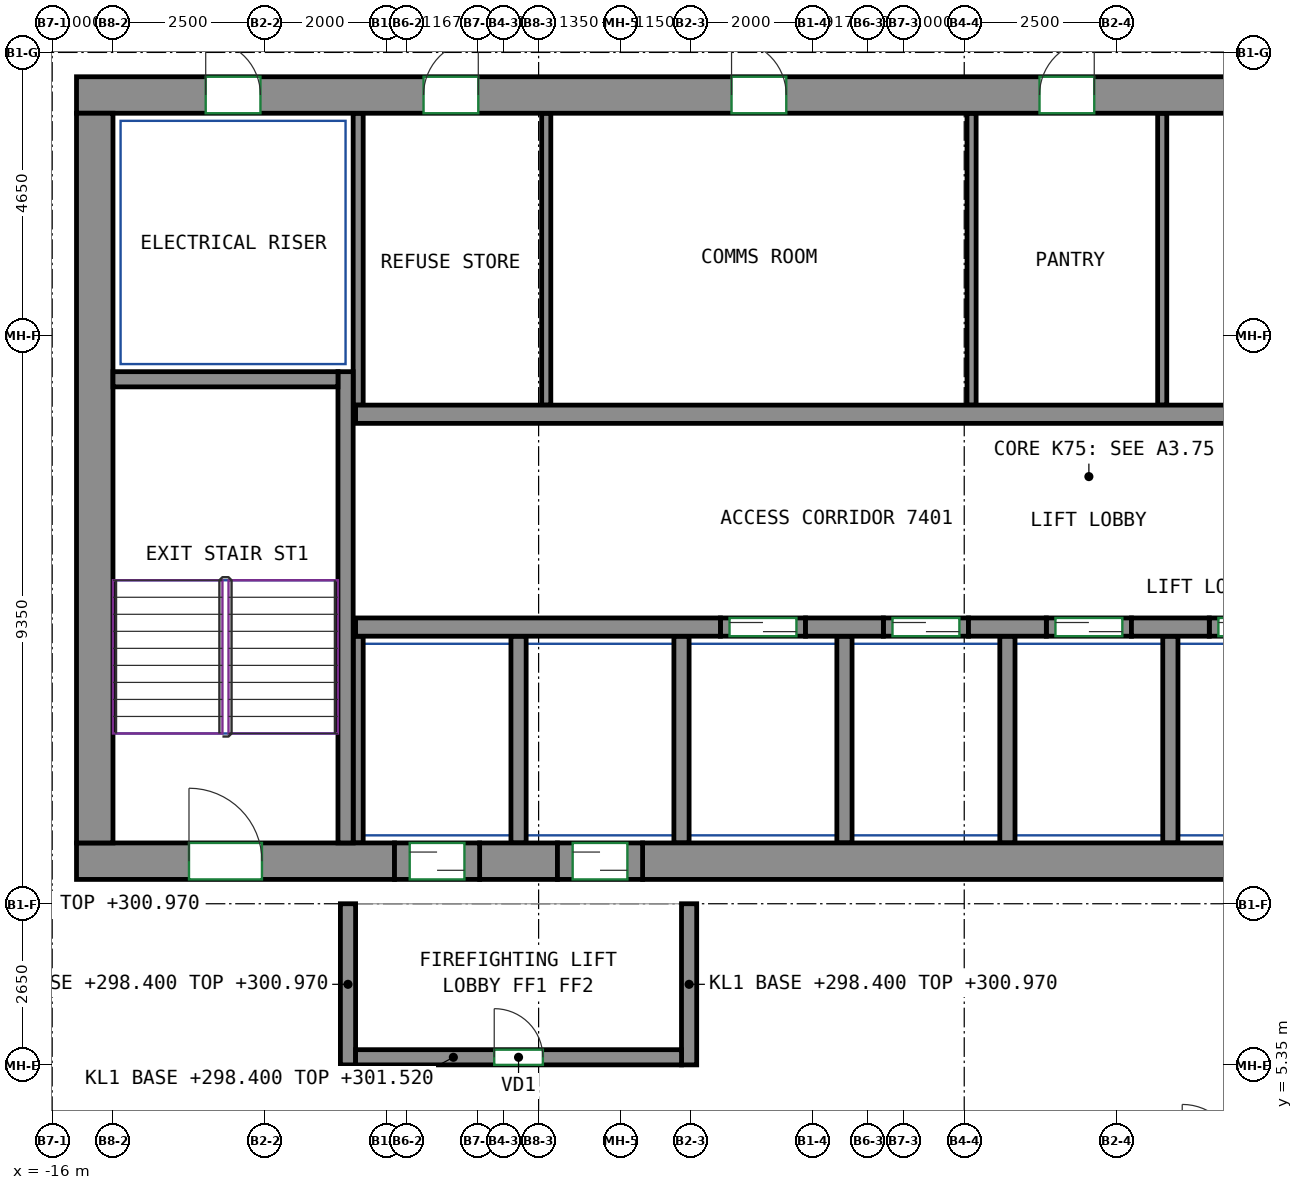
"""IFC4 building model, lengths in metres.
Left out: names, types, materials, properties, quantities, classifications, styles, units other than length and angle.
Written with IfcOpenShell. Run it as: python <this file> out.ifc"""

import sys

from ifc_helpers import new_model, si_unit, direction, frame, frame_2d, origin, place, context, subcontext, project, spatial, rectangle, extrude, source, transform, mapped, element, fill, save


model = new_model("IFC4")
c1 = context("Model", 3, precision=1e-05, world=origin(), true_north=direction((0.0, 1.0)))
c2 = subcontext(c1, "Body", "Model", "MODEL_VIEW")
j1 = project(units=[si_unit("LENGTHUNIT", "METRE"), si_unit("PLANEANGLEUNIT", "RADIAN")], contexts=[c1])
p1 = place(None, origin())
s1 = spatial("IfcSite", under=j1, at=p1, CompositionType="ELEMENT")
p2 = place(p1, origin())
s2 = spatial("IfcBuilding", under=s1, at=p2, CompositionType="ELEMENT")
p3 = place(p2, frame((0.0, 0.0, 298.4)))
s3 = spatial("IfcBuildingStorey", under=s2, at=p3, CompositionType="ELEMENT", Elevation=298.4)
m1 = source(origin(), c2, "Body", "SweptSolid", [
    extrude(rectangle(XDim=5.23, YDim=0.6, at=frame_2d((2.615, 0.0))), origin(), (0.0, 0.0, 1.0), 3.12),
])
p4 = place(p3, frame((-15.6, 8.7, 0.0), z_axis=(0.0, 0.0, 1.0), x_axis=(1.0, 0.0, 0.0)))
e1 = element("IfcWall", 1, at=p4, inside=s3, PredefinedType="SHEAR", context=c2, shape_type="MappedRepresentation", body=[
    mapped(m1, transform((0.0, 0.0, 0.0))),
])
p5 = place(p4, frame((1.85, 0.0, 0.0)))
e2 = element("IfcOpeningElement", 2, at=p5, cuts=e1, PredefinedType="OPENING", context=c2, shape_type="SweptSolid", body=[
    extrude(rectangle(XDim=1.2, YDim=2.1, at=frame_2d((0.6, 1.05))), frame((0.0, 0.31, 0.0), z_axis=(0.0, -1.0, 0.0), x_axis=(1.0, 0.0, 0.0)), (0.0, 0.0, 1.0), 0.62),
])
m2 = source(origin(), c2, "Body", "SweptSolid", [
    extrude(rectangle(XDim=1.28, YDim=0.6, at=frame_2d((0.64, 0.0))), origin(), (0.0, 0.0, 1.0), 3.12),
])
p6 = place(p3, frame((-8.97, 8.7, 0.0), z_axis=(0.0, 0.0, 1.0), x_axis=(1.0, 0.0, 0.0)))
e3 = element("IfcWall", 3, at=p6, inside=s3, PredefinedType="SHEAR", context=c2, shape_type="MappedRepresentation", body=[
    mapped(m2, transform((0.0, 0.0, 0.0))),
])
m3 = source(origin(), c2, "Body", "SweptSolid", [
    extrude(rectangle(XDim=14.18, YDim=0.6, at=frame_2d((7.09, 0.0))), origin(), (0.0, 0.0, 1.0), 3.12),
])
p7 = place(p3, frame((-6.29, 8.7, 0.0), z_axis=(0.0, 0.0, 1.0), x_axis=(1.0, 0.0, 0.0)))
e4 = element("IfcWall", 4, at=p7, inside=s3, PredefinedType="SHEAR", context=c2, shape_type="MappedRepresentation", body=[
    mapped(m3, transform((0.0, 0.0, 0.0))),
])
m4 = source(origin(), c2, "Body", "SweptSolid", [
    extrude(rectangle(XDim=33.3, YDim=0.6, at=frame_2d((16.65, 0.0))), origin(), (0.0, 0.0, 1.0), 3.12),
])
p8 = place(p3, frame((-15.6, 21.3, 0.0), z_axis=(0.0, 0.0, 1.0), x_axis=(1.0, 0.0, 0.0)))
e5 = element("IfcWall", 5, at=p8, inside=s3, PredefinedType="SHEAR", context=c2, shape_type="MappedRepresentation", body=[
    mapped(m4, transform((0.0, 0.0, 0.0))),
])
p9 = place(p8, frame((5.708, 0.0, 0.0)))
e6 = element("IfcOpeningElement", 6, at=p9, cuts=e5, PredefinedType="OPENING", context=c2, shape_type="SweptSolid", body=[
    extrude(rectangle(XDim=0.9, YDim=2.1, at=frame_2d((0.45, 1.05))), frame((0.0, 0.31, 0.0), z_axis=(0.0, -1.0, 0.0), x_axis=(1.0, 0.0, 0.0)), (0.0, 0.0, 1.0), 0.62),
])
p10 = place(p8, frame((10.773, 0.0, 0.0)))
e7 = element("IfcOpeningElement", 7, at=p10, cuts=e5, PredefinedType="OPENING", context=c2, shape_type="SweptSolid", body=[
    extrude(rectangle(XDim=0.9, YDim=2.1, at=frame_2d((0.45, 1.05))), frame((0.0, 0.31, 0.0), z_axis=(0.0, -1.0, 0.0), x_axis=(1.0, 0.0, 0.0)), (0.0, 0.0, 1.0), 0.62),
])
p11 = place(p8, frame((15.838, 0.0, 0.0)))
e8 = element("IfcOpeningElement", 8, at=p11, cuts=e5, PredefinedType="OPENING", context=c2, shape_type="SweptSolid", body=[
    extrude(rectangle(XDim=0.9, YDim=2.1, at=frame_2d((0.45, 1.05))), frame((0.0, 0.31, 0.0), z_axis=(0.0, -1.0, 0.0), x_axis=(1.0, 0.0, 0.0)), (0.0, 0.0, 1.0), 0.62),
])
p12 = place(p8, frame((21.493, 0.0, 0.0)))
e9 = element("IfcOpeningElement", 9, at=p12, cuts=e5, PredefinedType="OPENING", context=c2, shape_type="SweptSolid", body=[
    extrude(rectangle(XDim=0.9, YDim=2.1, at=frame_2d((0.45, 1.05))), frame((0.0, 0.31, 0.0), z_axis=(0.0, -1.0, 0.0), x_axis=(1.0, 0.0, 0.0)), (0.0, 0.0, 1.0), 0.62),
])
p13 = place(p8, frame((26.92, 0.0, 0.0)))
e10 = element("IfcOpeningElement", 10, at=p13, cuts=e5, PredefinedType="OPENING", context=c2, shape_type="SweptSolid", body=[
    extrude(rectangle(XDim=0.9, YDim=2.1, at=frame_2d((0.45, 1.05))), frame((0.0, 0.31, 0.0), z_axis=(0.0, -1.0, 0.0), x_axis=(1.0, 0.0, 0.0)), (0.0, 0.0, 1.0), 0.62),
])
p14 = place(p8, frame((2.125, 0.0, 0.0)))
e11 = element("IfcOpeningElement", 11, at=p14, cuts=e5, PredefinedType="OPENING", context=c2, shape_type="SweptSolid", body=[
    extrude(rectangle(XDim=0.9, YDim=2.1, at=frame_2d((0.45, 1.05))), frame((0.0, 0.31, 0.0), z_axis=(0.0, -1.0, 0.0), x_axis=(1.0, 0.0, 0.0)), (0.0, 0.0, 1.0), 0.62),
])
p15 = place(p8, frame((30.275, 0.0, 0.0)))
e12 = element("IfcOpeningElement", 12, at=p15, cuts=e5, PredefinedType="OPENING", context=c2, shape_type="SweptSolid", body=[
    extrude(rectangle(XDim=0.9, YDim=2.1, at=frame_2d((0.45, 1.05))), frame((0.0, 0.31, 0.0), z_axis=(0.0, -1.0, 0.0), x_axis=(1.0, 0.0, 0.0)), (0.0, 0.0, 1.0), 0.62),
])
m5 = source(origin(), c2, "Body", "SweptSolid", [
    extrude(rectangle(XDim=12.0, YDim=0.6, at=frame_2d((6.0, 0.0))), origin(), (0.0, 0.0, 1.0), 3.12),
])
p16 = place(p3, frame((-15.3, 9.0, 0.0), z_axis=(0.0, 0.0, 1.0), x_axis=(0.0, 1.0, 0.0)))
e13 = element("IfcWall", 13, at=p16, inside=s3, PredefinedType="SHEAR", context=c2, shape_type="MappedRepresentation", body=[
    mapped(m5, transform((0.0, 0.0, 0.0))),
])
m6 = source(origin(), c2, "Body", "SweptSolid", [
    extrude(rectangle(XDim=7.75, YDim=0.25, at=frame_2d((3.875, 0.0))), origin(), (0.0, 0.0, 1.0), 3.12),
])
p17 = place(p3, frame((-11.175, 9.0, 0.0), z_axis=(0.0, 0.0, 1.0), x_axis=(0.0, 1.0, 0.0)))
e14 = element("IfcWall", 14, at=p17, inside=s3, PredefinedType="SHEAR", context=c2, shape_type="MappedRepresentation", body=[
    mapped(m6, transform((0.0, 0.0, 0.0))),
])
m7 = source(origin(), c2, "Body", "SweptSolid", [
    extrude(rectangle(XDim=3.7, YDim=0.25, at=frame_2d((1.85, 0.0))), origin(), (0.0, 0.0, 1.0), 3.12),
])
p18 = place(p3, frame((-15.0, 16.625, 0.0), z_axis=(0.0, 0.0, 1.0), x_axis=(1.0, 0.0, 0.0)))
e15 = element("IfcWall", 15, at=p18, inside=s3, PredefinedType="SHEAR", context=c2, shape_type="MappedRepresentation", body=[
    mapped(m7, transform((0.0, 0.0, 0.0))),
])
m8 = source(origin(), c2, "Body", "SweptSolid", [
    extrude(rectangle(XDim=6.0, YDim=0.3, at=frame_2d((3.0, 0.0))), origin(), (0.0, 0.0, 1.0), 3.12),
])
p19 = place(p3, frame((-11.01, 12.55, 0.0), z_axis=(0.0, 0.0, 1.0), x_axis=(1.0, 0.0, 0.0)))
e16 = element("IfcWall", 16, at=p19, inside=s3, PredefinedType="SHEAR", context=c2, shape_type="MappedRepresentation", body=[
    mapped(m8, transform((0.0, 0.0, 0.0))),
])
m9 = source(origin(), c2, "Body", "SweptSolid", [
    extrude(rectangle(XDim=1.28, YDim=0.3, at=frame_2d((0.64, 0.0))), origin(), (0.0, 0.0, 1.0), 3.12),
])
for number, where, z_axis, x_axis in (
    (17, (-3.61, 12.55, 0.0), (0.0, 0.0, 1.0), (1.0, 0.0, 0.0)),
    (18, (-0.93, 12.55, 0.0), (0.0, 0.0, 1.0), (1.0, 0.0, 0.0)),
    (19, (1.75, 12.55, 0.0), (0.0, 0.0, 1.0), (1.0, 0.0, 0.0)),
):
    element("IfcWall", number, at=place(p3, frame(where, z_axis=z_axis, x_axis=x_axis)), inside=s3, PredefinedType="SHEAR", context=c2, shape_type="MappedRepresentation", body=[
        mapped(m9, transform((0.0, 0.0, 0.0))),
    ])
m10 = source(origin(), c2, "Body", "SweptSolid", [
    extrude(rectangle(XDim=22.08, YDim=0.3, at=frame_2d((11.04, 0.0))), origin(), (0.0, 0.0, 1.0), 3.12),
])
p20 = place(p3, frame((-11.01, 16.05, 0.0), z_axis=(0.0, 0.0, 1.0), x_axis=(1.0, 0.0, 0.0)))
e20 = element("IfcWall", 20, at=p20, inside=s3, PredefinedType="SHEAR", context=c2, shape_type="MappedRepresentation", body=[
    mapped(m10, transform((0.0, 0.0, 0.0))),
])
m11 = source(origin(), c2, "Body", "SweptSolid", [
    extrude(rectangle(XDim=1.4, YDim=0.3, at=frame_2d((0.7, 0.0))), origin(), (0.0, 0.0, 1.0), 3.12),
])
p21 = place(p3, frame((-5.01, 12.55, 0.0), z_axis=(0.0, 0.0, 1.0), x_axis=(1.0, 0.0, 0.0)))
e21 = element("IfcWall", 21, at=p21, inside=s3, PredefinedType="PARTITIONING", context=c2, shape_type="MappedRepresentation", body=[
    mapped(m11, transform((0.0, 0.0, 0.0))),
])
p22 = place(p21, frame((0.15, 0.0, 0.0)))
e22 = element("IfcOpeningElement", 22, at=p22, cuts=e21, PredefinedType="OPENING", context=c2, shape_type="SweptSolid", body=[
    extrude(rectangle(XDim=1.1, YDim=2.1, at=frame_2d((0.55, 1.05))), frame((0.0, 0.16, 0.0), z_axis=(0.0, -1.0, 0.0), x_axis=(1.0, 0.0, 0.0)), (0.0, 0.0, 1.0), 0.32),
])
m12 = source(origin(), c2, "Body", "SweptSolid", [
    extrude(rectangle(XDim=1.4, YDim=0.3, at=frame_2d((0.7, 0.0))), origin(), (0.0, 0.0, 1.0), 3.12),
])
p23 = place(p3, frame((-2.33, 12.55, 0.0), z_axis=(0.0, 0.0, 1.0), x_axis=(1.0, 0.0, 0.0)))
e23 = element("IfcWall", 23, at=p23, inside=s3, PredefinedType="PARTITIONING", context=c2, shape_type="MappedRepresentation", body=[
    mapped(m12, transform((0.0, 0.0, 0.0))),
])
p24 = place(p23, frame((0.15, 0.0, 0.0)))
e24 = element("IfcOpeningElement", 24, at=p24, cuts=e23, PredefinedType="OPENING", context=c2, shape_type="SweptSolid", body=[
    extrude(rectangle(XDim=1.1, YDim=2.1, at=frame_2d((0.55, 1.05))), frame((0.0, 0.16, 0.0), z_axis=(0.0, -1.0, 0.0), x_axis=(1.0, 0.0, 0.0)), (0.0, 0.0, 1.0), 0.32),
])
p25 = place(p3, frame((0.35, 12.55, 0.0), z_axis=(0.0, 0.0, 1.0), x_axis=(1.0, 0.0, 0.0)))
e25 = element("IfcWall", 25, at=p25, inside=s3, PredefinedType="PARTITIONING", context=c2, shape_type="MappedRepresentation", body=[
    mapped(m11, transform((0.0, 0.0, 0.0))),
])
p26 = place(p25, frame((0.15, 0.0, 0.0)))
e26 = element("IfcOpeningElement", 26, at=p26, cuts=e25, PredefinedType="OPENING", context=c2, shape_type="SweptSolid", body=[
    extrude(rectangle(XDim=1.1, YDim=2.1, at=frame_2d((0.55, 1.05))), frame((0.0, 0.16, 0.0), z_axis=(0.0, -1.0, 0.0), x_axis=(1.0, 0.0, 0.0)), (0.0, 0.0, 1.0), 0.32),
])
p27 = place(p3, frame((3.03, 12.55, 0.0), z_axis=(0.0, 0.0, 1.0), x_axis=(1.0, 0.0, 0.0)))
e27 = element("IfcWall", 27, at=p27, inside=s3, PredefinedType="PARTITIONING", context=c2, shape_type="MappedRepresentation", body=[
    mapped(m11, transform((0.0, 0.0, 0.0))),
])
p28 = place(p27, frame((0.15, 0.0, 0.0)))
e28 = element("IfcOpeningElement", 28, at=p28, cuts=e27, PredefinedType="OPENING", context=c2, shape_type="SweptSolid", body=[
    extrude(rectangle(XDim=1.1, YDim=2.1, at=frame_2d((0.55, 1.05))), frame((0.0, 0.16, 0.0), z_axis=(0.0, -1.0, 0.0), x_axis=(1.0, 0.0, 0.0)), (0.0, 0.0, 1.0), 0.32),
])
m13 = source(origin(), c2, "Body", "SweptSolid", [
    extrude(rectangle(XDim=2.65, YDim=0.25, at=frame_2d((1.325, 0.0))), origin(), (0.0, 0.0, 1.0), 2.57),
])
for number, where, z_axis, x_axis in (
    (29, (-11.135, 5.35, 0.0), (0.0, 0.0, 1.0), (0.0, 1.0, 0.0)),
    (30, (-5.525, 5.35, 0.0), (0.0, 0.0, 1.0), (0.0, 1.0, 0.0)),
):
    element("IfcWall", number, at=place(p3, frame(where, z_axis=z_axis, x_axis=x_axis)), inside=s3, PredefinedType="PARTITIONING", context=c2, shape_type="MappedRepresentation", body=[
        mapped(m13, transform((0.0, 0.0, 0.0))),
    ])
m14 = source(origin(), c2, "Body", "SweptSolid", [
    extrude(rectangle(XDim=5.36, YDim=0.25, at=frame_2d((2.68, 0.0))), origin(), (0.0, 0.0, 1.0), 3.12),
])
p29 = place(p3, frame((-11.01, 5.475, 0.0), z_axis=(0.0, 0.0, 1.0), x_axis=(1.0, 0.0, 0.0)))
e31 = element("IfcWall", 31, at=p29, inside=s3, PredefinedType="PARTITIONING", context=c2, shape_type="MappedRepresentation", body=[
    mapped(m14, transform((0.0, 0.0, 0.0))),
])
p30 = place(p29, frame((2.28, 0.0, 0.0)))
e32 = element("IfcOpeningElement", 32, at=p30, cuts=e31, PredefinedType="OPENING", context=c2, shape_type="SweptSolid", body=[
    extrude(rectangle(XDim=0.8, YDim=2.0, at=frame_2d((0.4, 1.0))), frame((0.0, 0.135, 0.0), z_axis=(0.0, -1.0, 0.0), x_axis=(1.0, 0.0, 0.0)), (0.0, 0.0, 1.0), 0.27),
])
m15 = source(origin(), c2, "Body", "SweptSolid", [
    extrude(rectangle(XDim=4.8, YDim=0.165, at=frame_2d((2.4, 0.0))), origin(), (0.0, 0.0, 1.0), 3.12),
])
p31 = place(p3, frame((-10.968, 16.2, 0.0), z_axis=(0.0, 0.0, 1.0), x_axis=(0.0, 1.0, 0.0)))
e33 = element("IfcWall", 33, at=p31, inside=s3, PredefinedType="PARTITIONING", context=c2, shape_type="MappedRepresentation", body=[
    mapped(m15, transform((0.0, 0.0, 0.0))),
])
m16 = source(origin(), c2, "Body", "SweptSolid", [
    extrude(rectangle(XDim=3.4, YDim=0.25, at=frame_2d((1.7, 0.0))), origin(), (0.0, 0.0, 1.0), 3.12),
])
for number, where, z_axis, x_axis in (
    (34, (2.39, 9.0, 0.0), (0.0, 0.0, 1.0), (0.0, 1.0, 0.0)),
    (35, (-0.29, 9.0, 0.0), (0.0, 0.0, 1.0), (0.0, 1.0, 0.0)),
):
    element("IfcWall", number, at=place(p3, frame(where, z_axis=z_axis, x_axis=x_axis)), inside=s3, PredefinedType="PARTITIONING", context=c2, shape_type="MappedRepresentation", body=[
        mapped(m16, transform((0.0, 0.0, 0.0))),
    ])
m17 = source(origin(), c2, "Body", "SweptSolid", [
    extrude(rectangle(XDim=3.4, YDim=0.165, at=frame_2d((1.7, 0.0))), origin(), (0.0, 0.0, 1.0), 3.12),
])
p32 = place(p3, frame((-10.968, 9.0, 0.0), z_axis=(0.0, 0.0, 1.0), x_axis=(0.0, 1.0, 0.0)))
e36 = element("IfcWall", 36, at=p32, inside=s3, PredefinedType="PARTITIONING", context=c2, shape_type="MappedRepresentation", body=[
    mapped(m17, transform((0.0, 0.0, 0.0))),
])
for number, where, z_axis, x_axis in (
    (37, (-2.97, 9.0, 0.0), (0.0, 0.0, 1.0), (0.0, 1.0, 0.0)),
    (38, (-5.65, 9.0, 0.0), (0.0, 0.0, 1.0), (0.0, 1.0, 0.0)),
    (39, (-8.33, 9.0, 0.0), (0.0, 0.0, 1.0), (0.0, 1.0, 0.0)),
):
    element("IfcWall", number, at=place(p3, frame(where, z_axis=z_axis, x_axis=x_axis)), inside=s3, PredefinedType="PARTITIONING", context=c2, shape_type="MappedRepresentation", body=[
        mapped(m16, transform((0.0, 0.0, 0.0))),
    ])
m18 = source(origin(), c2, "Body", "SweptSolid", [
    extrude(rectangle(XDim=4.8, YDim=0.15, at=frame_2d((2.4, 0.0))), origin(), (0.0, 0.0, 1.0), 3.12),
])
for number, where, z_axis, x_axis in (
    (40, (-7.875, 16.2, 0.0), (0.0, 0.0, 1.0), (0.0, 1.0, 0.0)),
    (41, (-0.88, 16.2, 0.0), (0.0, 0.0, 1.0), (0.0, 1.0, 0.0)),
    (42, (2.256, 16.2, 0.0), (0.0, 0.0, 1.0), (0.0, 1.0, 0.0)),
):
    element("IfcWall", number, at=place(p3, frame(where, z_axis=z_axis, x_axis=x_axis)), inside=s3, PredefinedType="PARTITIONING", context=c2, shape_type="MappedRepresentation", body=[
        mapped(m18, transform((0.0, 0.0, 0.0))),
    ])
m19 = source(origin(), c2, "Body", "SweptSolid", [
    extrude(rectangle(XDim=1.4, YDim=0.6, at=frame_2d((0.7, 0.0))), origin(), (0.0, 0.0, 1.0), 2.7),
])
p33 = place(p3, frame((-10.37, 8.7, 0.0), z_axis=(0.0, 0.0, 1.0), x_axis=(1.0, 0.0, 0.0)))
e43 = element("IfcWall", 43, at=p33, inside=s3, PredefinedType="PARTITIONING", context=c2, shape_type="MappedRepresentation", body=[
    mapped(m19, transform((0.0, 0.0, 0.0))),
])
p34 = place(p33, frame((0.25, 0.0, 0.0)))
e44 = element("IfcOpeningElement", 44, at=p34, cuts=e43, PredefinedType="OPENING", context=c2, shape_type="SweptSolid", body=[
    extrude(rectangle(XDim=0.9, YDim=2.1, at=frame_2d((0.45, 1.05))), frame((0.0, 0.31, 0.0), z_axis=(0.0, -1.0, 0.0), x_axis=(1.0, 0.0, 0.0)), (0.0, 0.0, 1.0), 0.62),
])
m20 = source(origin(), c2, "Body", "SweptSolid", [
    extrude(rectangle(XDim=1.4, YDim=0.6, at=frame_2d((0.7, 0.0))), origin(), (0.0, 0.0, 1.0), 2.7),
])
p35 = place(p3, frame((-7.69, 8.7, 0.0), z_axis=(0.0, 0.0, 1.0), x_axis=(1.0, 0.0, 0.0)))
e45 = element("IfcWall", 45, at=p35, inside=s3, PredefinedType="PARTITIONING", context=c2, shape_type="MappedRepresentation", body=[
    mapped(m20, transform((0.0, 0.0, 0.0))),
])
p36 = place(p35, frame((0.25, 0.0, 0.0)))
e46 = element("IfcOpeningElement", 46, at=p36, cuts=e45, PredefinedType="OPENING", context=c2, shape_type="SweptSolid", body=[
    extrude(rectangle(XDim=0.9, YDim=2.1, at=frame_2d((0.45, 1.05))), frame((0.0, 0.31, 0.0), z_axis=(0.0, -1.0, 0.0), x_axis=(1.0, 0.0, 0.0)), (0.0, 0.0, 1.0), 0.62),
])
p37 = place(p30, origin())
e47 = element("IfcDoor", 47, at=p37, inside=s3, OperationType="SINGLE_SWING_LEFT", PredefinedType="DOOR", context=c2, shape_type="SweptSolid", body=[
    extrude(rectangle(XDim=0.8, YDim=2.0, at=frame_2d((0.4, 1.0))), frame((0.0, 0.025, 0.0), z_axis=(0.0, -1.0, 0.0), x_axis=(1.0, 0.0, 0.0)), (0.0, 0.0, 1.0), 0.05),
])
fill(e32, e47)
p38 = place(p34, origin())
e48 = element("IfcDoor", 48, at=p38, inside=s3, OperationType="SLIDING_TO_LEFT", PredefinedType="DOOR", context=c2, shape_type="SweptSolid", body=[
    extrude(rectangle(XDim=0.9, YDim=2.1, at=frame_2d((0.45, 1.05))), frame((0.0, 0.205, 0.0), z_axis=(0.0, -1.0, 0.0), x_axis=(1.0, 0.0, 0.0)), (0.0, 0.0, 1.0), 0.05),
])
fill(e44, e48)
p39 = place(p36, origin())
e49 = element("IfcDoor", 49, at=p39, inside=s3, OperationType="SLIDING_TO_RIGHT", PredefinedType="DOOR", context=c2, shape_type="SweptSolid", body=[
    extrude(rectangle(XDim=0.9, YDim=2.1, at=frame_2d((0.45, 1.05))), frame((0.0, 0.205, 0.0), z_axis=(0.0, -1.0, 0.0), x_axis=(1.0, 0.0, 0.0)), (0.0, 0.0, 1.0), 0.05),
])
fill(e46, e49)
p40 = place(p22, origin())
e50 = element("IfcDoor", 50, at=p40, inside=s3, OperationType="DOUBLE_DOOR_SLIDING", PredefinedType="DOOR", context=c2, shape_type="SweptSolid", body=[
    extrude(rectangle(XDim=1.1, YDim=2.1, at=frame_2d((0.55, 1.05))), frame((0.0, 0.025, 0.0), z_axis=(0.0, -1.0, 0.0), x_axis=(1.0, 0.0, 0.0)), (0.0, 0.0, 1.0), 0.05),
])
fill(e22, e50)
p41 = place(p24, origin())
e51 = element("IfcDoor", 51, at=p41, inside=s3, OperationType="DOUBLE_DOOR_SLIDING", PredefinedType="DOOR", context=c2, shape_type="SweptSolid", body=[
    extrude(rectangle(XDim=1.1, YDim=2.1, at=frame_2d((0.55, 1.05))), frame((0.0, 0.025, 0.0), z_axis=(0.0, -1.0, 0.0), x_axis=(1.0, 0.0, 0.0)), (0.0, 0.0, 1.0), 0.05),
])
fill(e24, e51)
p42 = place(p26, origin())
e52 = element("IfcDoor", 52, at=p42, inside=s3, OperationType="DOUBLE_DOOR_SLIDING", PredefinedType="DOOR", context=c2, shape_type="SweptSolid", body=[
    extrude(rectangle(XDim=1.1, YDim=2.1, at=frame_2d((0.55, 1.05))), frame((0.0, 0.025, 0.0), z_axis=(0.0, -1.0, 0.0), x_axis=(1.0, 0.0, 0.0)), (0.0, 0.0, 1.0), 0.05),
])
fill(e26, e52)
p43 = place(p28, origin())
e53 = element("IfcDoor", 53, at=p43, inside=s3, OperationType="DOUBLE_DOOR_SLIDING", PredefinedType="DOOR", context=c2, shape_type="SweptSolid", body=[
    extrude(rectangle(XDim=1.1, YDim=2.1, at=frame_2d((0.55, 1.05))), frame((0.0, 0.025, 0.0), z_axis=(0.0, -1.0, 0.0), x_axis=(1.0, 0.0, 0.0)), (0.0, 0.0, 1.0), 0.05),
])
fill(e28, e53)
p44 = place(p9, origin())
e54 = element("IfcDoor", 54, at=p44, inside=s3, OperationType="SINGLE_SWING_RIGHT", PredefinedType="DOOR", context=c2, shape_type="SweptSolid", body=[
    extrude(rectangle(XDim=0.9, YDim=2.1, at=frame_2d((0.45, 1.05))), frame((0.0, -0.155, 0.0), z_axis=(0.0, -1.0, 0.0), x_axis=(1.0, 0.0, 0.0)), (0.0, 0.0, 1.0), 0.05),
])
fill(e6, e54)
p45 = place(p10, origin())
e55 = element("IfcDoor", 55, at=p45, inside=s3, OperationType="SINGLE_SWING_LEFT", PredefinedType="DOOR", context=c2, shape_type="SweptSolid", body=[
    extrude(rectangle(XDim=0.9, YDim=2.1, at=frame_2d((0.45, 1.05))), frame((0.0, -0.155, 0.0), z_axis=(0.0, -1.0, 0.0), x_axis=(1.0, 0.0, 0.0)), (0.0, 0.0, 1.0), 0.05),
])
fill(e7, e55)
p46 = place(p11, origin())
e56 = element("IfcDoor", 56, at=p46, inside=s3, OperationType="SINGLE_SWING_RIGHT", PredefinedType="DOOR", context=c2, shape_type="SweptSolid", body=[
    extrude(rectangle(XDim=0.9, YDim=2.1, at=frame_2d((0.45, 1.05))), frame((0.0, -0.155, 0.0), z_axis=(0.0, -1.0, 0.0), x_axis=(1.0, 0.0, 0.0)), (0.0, 0.0, 1.0), 0.05),
])
fill(e8, e56)
p47 = place(p14, origin())
e57 = element("IfcDoor", 57, at=p47, inside=s3, OperationType="SINGLE_SWING_LEFT", PredefinedType="DOOR", context=c2, shape_type="SweptSolid", body=[
    extrude(rectangle(XDim=0.9, YDim=2.1, at=frame_2d((0.45, 1.05))), frame((0.0, -0.155, 0.0), z_axis=(0.0, -1.0, 0.0), x_axis=(1.0, 0.0, 0.0)), (0.0, 0.0, 1.0), 0.05),
])
fill(e11, e57)
p48 = place(p5, origin())
e58 = element("IfcDoor", 58, at=p48, inside=s3, OperationType="DOUBLE_DOOR_SINGLE_SWING", PredefinedType="DOOR", context=c2, shape_type="SweptSolid", body=[
    extrude(rectangle(XDim=1.2, YDim=2.1, at=frame_2d((0.6, 1.05))), frame((0.0, 0.205, 0.0), z_axis=(0.0, -1.0, 0.0), x_axis=(1.0, 0.0, 0.0)), (0.0, 0.0, 1.0), 0.05),
])
fill(e2, e58)
save(model, sys.argv[1])
